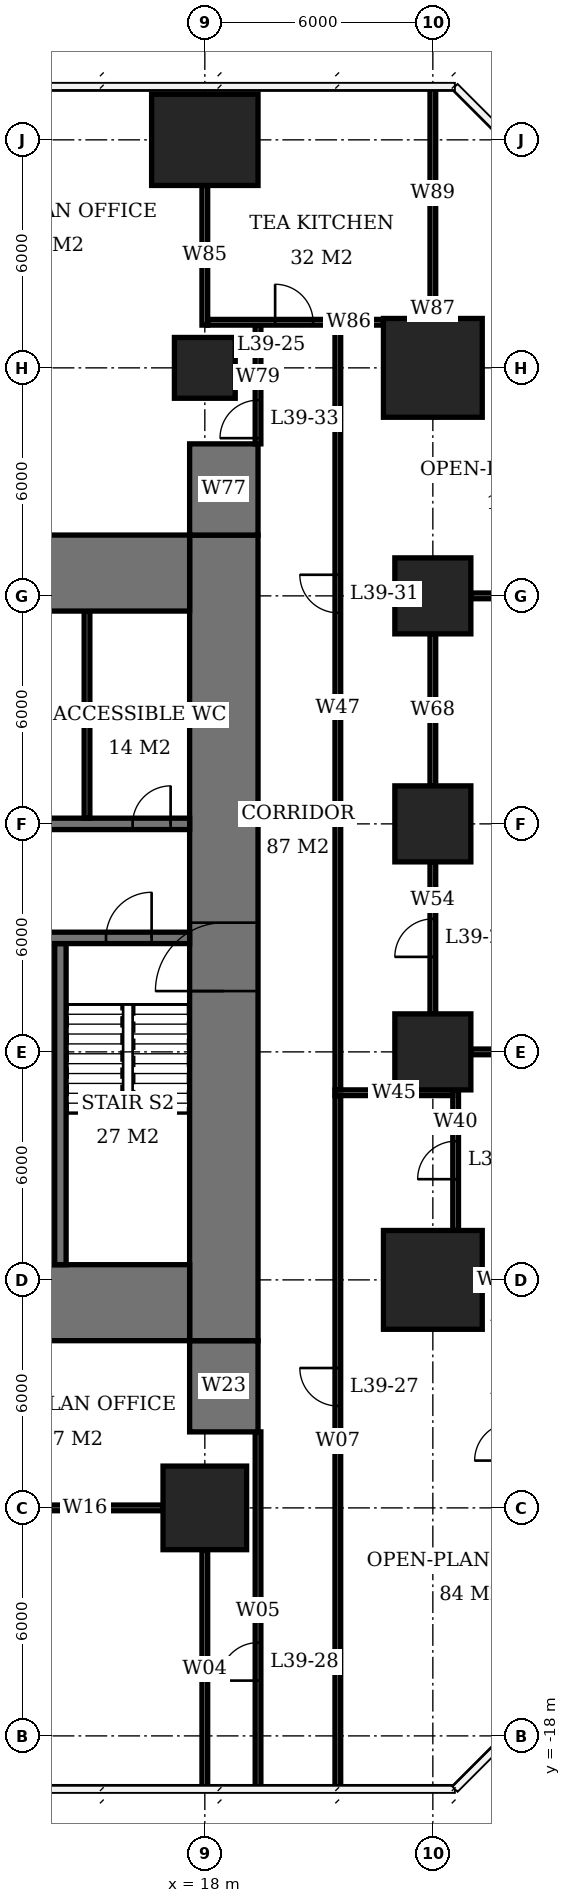
"""IFC4 building model, lengths in metres.
Left out: names, types, materials, properties, quantities, classifications, styles, units other than length and angle.
Written with IfcOpenShell. Run it as: python <this file> out.ifc"""

import sys

from ifc_helpers import new_model, si_unit, direction, frame, frame_2d, origin, origin_2d, place, context, subcontext, project, spatial, rectangle, extrude, element, fill, save


model = new_model("IFC4")
c1 = context("Model", 3, precision=1e-05, world=origin(), true_north=direction((0.0, 1.0)))
c2 = subcontext(c1, "Body", "Model", "MODEL_VIEW")
j1 = project(units=[si_unit("LENGTHUNIT", "METRE"), si_unit("PLANEANGLEUNIT", "RADIAN")], contexts=[c1])
p1 = place(None, origin())
s1 = spatial("IfcSite", under=j1, at=p1, CompositionType="ELEMENT")
p2 = place(p1, origin())
s2 = spatial("IfcBuilding", under=s1, at=p2, CompositionType="ELEMENT")
p3 = place(p2, frame((0.0, 0.0, 160.1)))
s3 = spatial("IfcBuildingStorey", under=s2, at=p3, CompositionType="ELEMENT", Elevation=160.1)
p4 = place(p3, frame((18.0, -12.0, 0.0), z_axis=(0.0, 0.0, 1.0), x_axis=(1.0, 0.0, 0.0)))
e1 = element("IfcColumn", 1, at=p4, inside=s3, PredefinedType="COLUMN", context=c2, shape_type="SweptSolid", body=[
    extrude(rectangle(XDim=2.2, YDim=2.2, at=origin_2d()), origin(), (0.0, 0.0, 1.0), 3.9),
])
p5 = place(p3, frame((18.0, 18.0, 0.0), z_axis=(0.0, 0.0, 1.0), x_axis=(1.0, 0.0, 0.0)))
e2 = element("IfcColumn", 2, at=p5, inside=s3, PredefinedType="COLUMN", context=c2, shape_type="SweptSolid", body=[
    extrude(rectangle(XDim=1.6, YDim=1.6, at=origin_2d()), origin(), (0.0, 0.0, 1.0), 3.9),
])
p6 = place(p3, frame((18.0, 24.0, 0.0), z_axis=(0.0, 0.0, 1.0), x_axis=(1.0, 0.0, 0.0)))
e3 = element("IfcColumn", 3, at=p6, inside=s3, PredefinedType="COLUMN", context=c2, shape_type="SweptSolid", body=[
    extrude(rectangle(XDim=2.8, YDim=2.4, at=origin_2d()), origin(), (0.0, 0.0, 1.0), 3.9),
])
p7 = place(p3, frame((24.0, -6.0, 0.0), z_axis=(0.0, 0.0, 1.0), x_axis=(1.0, 0.0, 0.0)))
e4 = element("IfcColumn", 4, at=p7, inside=s3, PredefinedType="COLUMN", context=c2, shape_type="SweptSolid", body=[
    extrude(rectangle(XDim=2.6, YDim=2.6, at=origin_2d()), origin(), (0.0, 0.0, 1.0), 3.9),
])
for number, where, z_axis, x_axis in (
    (5, (24.0, 0.0, 0.0), (0.0, 0.0, 1.0), (1.0, 0.0, 0.0)),
    (6, (24.0, 6.0, 0.0), (0.0, 0.0, 1.0), (1.0, 0.0, 0.0)),
    (7, (24.0, 12.0, 0.0), (0.0, 0.0, 1.0), (1.0, 0.0, 0.0)),
):
    element("IfcColumn", number, at=place(p3, frame(where, z_axis=z_axis, x_axis=x_axis)), inside=s3, PredefinedType="COLUMN", context=c2, shape_type="SweptSolid", body=[
        extrude(rectangle(XDim=2.0, YDim=2.0, at=origin_2d()), origin(), (0.0, 0.0, 1.0), 3.9),
    ])
p8 = place(p3, frame((24.0, 18.0, 0.0), z_axis=(0.0, 0.0, 1.0), x_axis=(1.0, 0.0, 0.0)))
e8 = element("IfcColumn", 8, at=p8, inside=s3, PredefinedType="COLUMN", context=c2, shape_type="SweptSolid", body=[
    extrude(rectangle(XDim=2.6, YDim=2.6, at=origin_2d()), origin(), (0.0, 0.0, 1.0), 3.9),
])
for number, where, z_axis, x_axis in (
    (9, (-5.6, -6.6, 0.0), (0.0, 0.0, 1.0), (1.0, 0.0, 0.0)),
    (10, (-5.6, 12.6, 0.0), (0.0, 0.0, 1.0), (1.0, 0.0, 0.0)),
):
    element("IfcWall", number, at=place(p3, frame(where, z_axis=z_axis, x_axis=x_axis)), inside=s3, PredefinedType="SHEAR", context=c2, shape_type="SweptSolid", body=[
        extrude(rectangle(XDim=23.2, YDim=2.0, at=frame_2d((11.6, 0.0))), origin(), (0.0, 0.0, 1.0), 3.9),
    ])
p9 = place(p3, frame((18.5, -7.6, 0.0), z_axis=(0.0, 0.0, 1.0), x_axis=(0.0, 1.0, 0.0)))
e11 = element("IfcWall", 11, at=p9, inside=s3, PredefinedType="SHEAR", context=c2, shape_type="SweptSolid", body=[
    extrude(rectangle(XDim=21.2, YDim=1.8, at=frame_2d((10.6, 0.0))), origin(), (0.0, 0.0, 1.0), 3.9),
])
p10 = place(p9, frame((9.2, 0.0, 0.0)))
e12 = element("IfcOpeningElement", 12, at=p10, cuts=e11, PredefinedType="OPENING", context=c2, shape_type="SweptSolid", body=[
    extrude(rectangle(XDim=1.8, YDim=2.4, at=frame_2d((0.9, 1.2))), frame((0.0, 0.91, 0.0), z_axis=(0.0, -1.0, 0.0), x_axis=(1.0, 0.0, 0.0)), (0.0, 0.0, 1.0), 1.82),
])
for number, where, z_axis, x_axis in (
    (13, (18.5, -10.0, 0.0), (0.0, 0.0, 1.0), (0.0, 1.0, 0.0)),
    (14, (18.5, 13.6, 0.0), (0.0, 0.0, 1.0), (0.0, 1.0, 0.0)),
):
    element("IfcWall", number, at=place(p3, frame(where, z_axis=z_axis, x_axis=x_axis)), inside=s3, PredefinedType="SHEAR", context=c2, shape_type="SweptSolid", body=[
        extrude(rectangle(XDim=2.4, YDim=1.8, at=frame_2d((1.2, 0.0))), origin(), (0.0, 0.0, 1.0), 3.9),
    ])
p11 = place(p3, frame((12.15, 3.0, 0.0), z_axis=(0.0, 0.0, 1.0), x_axis=(1.0, 0.0, 0.0)))
e15 = element("IfcWall", 15, at=p11, inside=s3, PredefinedType="SHEAR", context=c2, shape_type="SweptSolid", body=[
    extrude(rectangle(XDim=5.45, YDim=0.3, at=frame_2d((2.725, 0.0))), origin(), (0.0, 0.0, 1.0), 3.9),
])
p12 = place(p11, frame((3.25, 0.0, 0.0)))
e16 = element("IfcOpeningElement", 16, at=p12, cuts=e15, PredefinedType="OPENING", context=c2, shape_type="SweptSolid", body=[
    extrude(rectangle(XDim=1.2, YDim=2.1, at=frame_2d((0.6, 1.05))), frame((0.0, 0.16, 0.0), z_axis=(0.0, -1.0, 0.0), x_axis=(1.0, 0.0, 0.0)), (0.0, 0.0, 1.0), 0.32),
])
p13 = place(p11, frame((0.45, 0.0, 0.0)))
e17 = element("IfcOpeningElement", 17, at=p13, cuts=e15, PredefinedType="OPENING", context=c2, shape_type="SweptSolid", body=[
    extrude(rectangle(XDim=0.9, YDim=2.1, at=frame_2d((0.45, 1.05))), frame((0.0, 0.16, 0.0), z_axis=(0.0, -1.0, 0.0), x_axis=(1.0, 0.0, 0.0)), (0.0, 0.0, 1.0), 0.32),
])
p14 = place(p3, frame((-0.15, 6.0, 0.0), z_axis=(0.0, 0.0, 1.0), x_axis=(1.0, 0.0, 0.0)))
e18 = element("IfcWall", 18, at=p14, inside=s3, PredefinedType="SHEAR", context=c2, shape_type="SweptSolid", body=[
    extrude(rectangle(XDim=17.75, YDim=0.3, at=frame_2d((8.875, 0.0))), origin(), (0.0, 0.0, 1.0), 3.9),
])
p15 = place(p14, frame((13.15, 0.0, 0.0)))
e19 = element("IfcOpeningElement", 19, at=p15, cuts=e18, PredefinedType="OPENING", context=c2, shape_type="SweptSolid", body=[
    extrude(rectangle(XDim=0.9, YDim=2.1, at=frame_2d((0.45, 1.05))), frame((0.0, 0.16, 0.0), z_axis=(0.0, -1.0, 0.0), x_axis=(1.0, 0.0, 0.0)), (0.0, 0.0, 1.0), 0.32),
])
p16 = place(p14, frame((16.25, 0.0, 0.0)))
e20 = element("IfcOpeningElement", 20, at=p16, cuts=e18, PredefinedType="OPENING", context=c2, shape_type="SweptSolid", body=[
    extrude(rectangle(XDim=1.0, YDim=2.1, at=frame_2d((0.5, 1.05))), frame((0.0, 0.16, 0.0), z_axis=(0.0, -1.0, 0.0), x_axis=(1.0, 0.0, 0.0)), (0.0, 0.0, 1.0), 0.32),
])
p17 = place(p14, frame((7.25, 0.0, 0.0)))
e21 = element("IfcOpeningElement", 21, at=p17, cuts=e18, PredefinedType="OPENING", context=c2, shape_type="SweptSolid", body=[
    extrude(rectangle(XDim=1.0, YDim=2.1, at=frame_2d((0.5, 1.05))), frame((0.0, 0.16, 0.0), z_axis=(0.0, -1.0, 0.0), x_axis=(1.0, 0.0, 0.0)), (0.0, 0.0, 1.0), 0.32),
])
p18 = place(p14, frame((1.1, 0.0, 0.0)))
e22 = element("IfcOpeningElement", 22, at=p18, cuts=e18, PredefinedType="OPENING", context=c2, shape_type="SweptSolid", body=[
    extrude(rectangle(XDim=1.1, YDim=2.1, at=frame_2d((0.55, 1.05))), frame((0.0, 0.16, 0.0), z_axis=(0.0, -1.0, 0.0), x_axis=(1.0, 0.0, 0.0)), (0.0, 0.0, 1.0), 0.32),
])
p19 = place(p14, frame((4.1, 0.0, 0.0)))
e23 = element("IfcOpeningElement", 23, at=p19, cuts=e18, PredefinedType="OPENING", context=c2, shape_type="SweptSolid", body=[
    extrude(rectangle(XDim=1.1, YDim=2.1, at=frame_2d((0.55, 1.05))), frame((0.0, 0.16, 0.0), z_axis=(0.0, -1.0, 0.0), x_axis=(1.0, 0.0, 0.0)), (0.0, 0.0, 1.0), 0.32),
])
p20 = place(p3, frame((14.2, -5.6, 0.0), z_axis=(0.0, 0.0, 1.0), x_axis=(0.0, 1.0, 0.0)))
e24 = element("IfcWall", 24, at=p20, inside=s3, PredefinedType="SHEAR", context=c2, shape_type="SweptSolid", body=[
    extrude(rectangle(XDim=8.45, YDim=0.3, at=frame_2d((4.225, 0.0))), origin(), (0.0, 0.0, 1.0), 3.9),
])
p21 = place(p3, frame((14.9, 6.15, 0.0), z_axis=(0.0, 0.0, 1.0), x_axis=(0.0, 1.0, 0.0)))
e25 = element("IfcWall", 25, at=p21, inside=s3, PredefinedType="PLUMBINGWALL", context=c2, shape_type="SweptSolid", body=[
    extrude(rectangle(XDim=5.45, YDim=0.15, at=frame_2d((2.725, 0.0))), origin(), (0.0, 0.0, 1.0), 3.65),
])
p22 = place(p3, frame((12.8, -12.0, 0.0), z_axis=(0.0, 0.0, 1.0), x_axis=(1.0, 0.0, 0.0)))
e26 = element("IfcWall", 26, at=p22, inside=s3, PredefinedType="PARTITIONING", context=c2, shape_type="SweptSolid", body=[
    extrude(rectangle(XDim=4.1, YDim=0.15, at=frame_2d((2.05, 0.0))), origin(), (0.0, 0.0, 1.0), 3.65),
])
p23 = place(p3, frame((25.3, -6.0, 0.0), z_axis=(0.0, 0.0, 1.0), x_axis=(1.0, 0.0, 0.0)))
e27 = element("IfcWall", 27, at=p23, inside=s3, PredefinedType="PARTITIONING", context=c2, shape_type="SweptSolid", body=[
    extrude(rectangle(XDim=0.875, YDim=0.15, at=frame_2d((0.438, 0.0))), origin(), (0.0, 0.0, 1.0), 2.15),
])
for number, where, z_axis, x_axis in (
    (28, (25.0, 0.0, 0.0), (0.0, 0.0, 1.0), (1.0, 0.0, 0.0)),
    (29, (25.0, 12.0, 0.0), (0.0, 0.0, 1.0), (1.0, 0.0, 0.0)),
):
    element("IfcWall", number, at=place(p3, frame(where, z_axis=z_axis, x_axis=x_axis)), inside=s3, PredefinedType="PARTITIONING", context=c2, shape_type="SweptSolid", body=[
        extrude(rectangle(XDim=3.36, YDim=0.15, at=frame_2d((1.68, 0.0))), origin(), (0.0, 0.0, 1.0), 2.15),
    ])
p24 = place(p3, frame((18.075, 19.2, 0.0), z_axis=(0.0, 0.0, 1.0), x_axis=(1.0, 0.0, 0.0)))
e30 = element("IfcWall", 30, at=p24, inside=s3, PredefinedType="PARTITIONING", context=c2, shape_type="SweptSolid", body=[
    extrude(rectangle(XDim=4.625, YDim=0.15, at=frame_2d((2.312, 0.0))), origin(), (0.0, 0.0, 1.0), 3.65),
])
p25 = place(p24, frame((1.775, 0.0, 0.0)))
e31 = element("IfcOpeningElement", 31, at=p25, cuts=e30, PredefinedType="OPENING", context=c2, shape_type="SweptSolid", body=[
    extrude(rectangle(XDim=1.0, YDim=2.1, at=frame_2d((0.5, 1.05))), frame((0.0, 0.085, 0.0), z_axis=(0.0, -1.0, 0.0), x_axis=(1.0, 0.0, 0.0)), (0.0, 0.0, 1.0), 0.17),
])
p26 = place(p3, frame((18.0, -19.4, 0.0), z_axis=(0.0, 0.0, 1.0), x_axis=(0.0, 1.0, 0.0)))
e32 = element("IfcWall", 32, at=p26, inside=s3, PredefinedType="PARTITIONING", context=c2, shape_type="SweptSolid", body=[
    extrude(rectangle(XDim=6.3, YDim=0.15, at=frame_2d((3.15, 0.0))), origin(), (0.0, 0.0, 1.0), 3.65),
])
p27 = place(p3, frame((18.0, 19.125, 0.0), z_axis=(0.0, 0.0, 1.0), x_axis=(0.0, 1.0, 0.0)))
e33 = element("IfcWall", 33, at=p27, inside=s3, PredefinedType="PARTITIONING", context=c2, shape_type="SweptSolid", body=[
    extrude(rectangle(XDim=3.675, YDim=0.15, at=frame_2d((1.837, 0.0))), origin(), (0.0, 0.0, 1.0), 3.65),
])
p28 = place(p3, frame((24.0, 1.0, 0.0), z_axis=(0.0, 0.0, 1.0), x_axis=(0.0, 1.0, 0.0)))
e34 = element("IfcWall", 34, at=p28, inside=s3, PredefinedType="PARTITIONING", context=c2, shape_type="SweptSolid", body=[
    extrude(rectangle(XDim=4.0, YDim=0.15, at=frame_2d((2.0, 0.0))), origin(), (0.0, 0.0, 1.0), 3.65),
])
p29 = place(p28, frame((1.5, 0.0, 0.0)))
e35 = element("IfcOpeningElement", 35, at=p29, cuts=e34, PredefinedType="OPENING", context=c2, shape_type="SweptSolid", body=[
    extrude(rectangle(XDim=1.0, YDim=2.1, at=frame_2d((0.5, 1.05))), frame((0.0, 0.085, 0.0), z_axis=(0.0, -1.0, 0.0), x_axis=(1.0, 0.0, 0.0)), (0.0, 0.0, 1.0), 0.17),
])
p30 = place(p3, frame((24.0, 7.0, 0.0), z_axis=(0.0, 0.0, 1.0), x_axis=(0.0, 1.0, 0.0)))
e36 = element("IfcWall", 36, at=p30, inside=s3, PredefinedType="PARTITIONING", context=c2, shape_type="SweptSolid", body=[
    extrude(rectangle(XDim=4.0, YDim=0.15, at=frame_2d((2.0, 0.0))), origin(), (0.0, 0.0, 1.0), 3.65),
])
p31 = place(p3, frame((24.0, 19.3, 0.0), z_axis=(0.0, 0.0, 1.0), x_axis=(0.0, 1.0, 0.0)))
e37 = element("IfcWall", 37, at=p31, inside=s3, PredefinedType="PARTITIONING", context=c2, shape_type="SweptSolid", body=[
    extrude(rectangle(XDim=0.492, YDim=0.15, at=frame_2d((0.246, 0.0))), origin(), (0.0, 0.0, 1.0), 2.15),
])
p32 = place(p3, frame((24.0, 19.792, 0.0), z_axis=(0.0, 0.0, 1.0), x_axis=(0.0, 1.0, 0.0)))
e38 = element("IfcWall", 38, at=p32, inside=s3, PredefinedType="PARTITIONING", context=c2, shape_type="SweptSolid", body=[
    extrude(rectangle(XDim=5.597, YDim=0.15, at=frame_2d((2.799, 0.0))), origin(), (0.0, 0.0, 1.0), 3.65),
])
p33 = place(p3, frame((24.6, -4.7, 0.0), z_axis=(0.0, 0.0, 1.0), x_axis=(0.0, 1.0, 0.0)))
e39 = element("IfcWall", 39, at=p33, inside=s3, PredefinedType="PARTITIONING", context=c2, shape_type="SweptSolid", body=[
    extrude(rectangle(XDim=3.7, YDim=0.15, at=frame_2d((1.85, 0.0))), origin(), (0.0, 0.0, 1.0), 3.65),
])
p34 = place(p33, frame((1.35, 0.0, 0.0)))
e40 = element("IfcOpeningElement", 40, at=p34, cuts=e39, PredefinedType="OPENING", context=c2, shape_type="SweptSolid", body=[
    extrude(rectangle(XDim=1.0, YDim=2.1, at=frame_2d((0.5, 1.05))), frame((0.0, 0.085, 0.0), z_axis=(0.0, -1.0, 0.0), x_axis=(1.0, 0.0, 0.0)), (0.0, 0.0, 1.0), 0.17),
])
p35 = place(p3, frame((19.4, -19.4, 0.0), z_axis=(0.0, 0.0, 1.0), x_axis=(0.0, 1.0, 0.0)))
e41 = element("IfcWall", 41, at=p35, inside=s3, PredefinedType="PARTITIONING", context=c2, shape_type="SweptSolid", body=[
    extrude(rectangle(XDim=9.4, YDim=0.15, at=frame_2d((4.7, 0.0))), origin(), (0.0, 0.0, 1.0), 3.65),
])
p36 = place(p35, frame((2.855, 0.0, 0.0)))
e42 = element("IfcOpeningElement", 42, at=p36, cuts=e41, PredefinedType="OPENING", context=c2, shape_type="SweptSolid", body=[
    extrude(rectangle(XDim=1.0, YDim=2.1, at=frame_2d((0.5, 1.05))), frame((0.0, 0.085, 0.0), z_axis=(0.0, -1.0, 0.0), x_axis=(1.0, 0.0, 0.0)), (0.0, 0.0, 1.0), 0.17),
])
p37 = place(p3, frame((19.4, 16.0, 0.0), z_axis=(0.0, 0.0, 1.0), x_axis=(0.0, 1.0, 0.0)))
e43 = element("IfcWall", 43, at=p37, inside=s3, PredefinedType="PARTITIONING", context=c2, shape_type="SweptSolid", body=[
    extrude(rectangle(XDim=3.125, YDim=0.15, at=frame_2d((1.562, 0.0))), origin(), (0.0, 0.0, 1.0), 3.65),
])
p38 = place(p37, frame((0.15, 0.0, 0.0)))
e44 = element("IfcOpeningElement", 44, at=p38, cuts=e43, PredefinedType="OPENING", context=c2, shape_type="SweptSolid", body=[
    extrude(rectangle(XDim=1.0, YDim=2.1, at=frame_2d((0.5, 1.05))), frame((0.0, 0.085, 0.0), z_axis=(0.0, -1.0, 0.0), x_axis=(1.0, 0.0, 0.0)), (0.0, 0.0, 1.0), 0.17),
])
p39 = place(p3, frame((21.5, -19.35, 0.0), z_axis=(0.0, 0.0, 1.0), x_axis=(0.0, 1.0, 0.0)))
e45 = element("IfcWall", 45, at=p39, inside=s3, PredefinedType="PARTITIONING", context=c2, shape_type="SweptSolid", body=[
    extrude(rectangle(XDim=18.2, YDim=0.15, at=frame_2d((9.1, 0.0))), origin(), (0.0, 0.0, 1.0), 3.65),
])
p40 = place(p39, frame((10.031, 0.0, 0.0)))
e46 = element("IfcOpeningElement", 46, at=p40, cuts=e45, PredefinedType="OPENING", context=c2, shape_type="SweptSolid", body=[
    extrude(rectangle(XDim=1.0, YDim=2.1, at=frame_2d((0.5, 1.05))), frame((0.0, 0.085, 0.0), z_axis=(0.0, -1.0, 0.0), x_axis=(1.0, 0.0, 0.0)), (0.0, 0.0, 1.0), 0.17),
])
p41 = place(p3, frame((21.5, -1.0, 0.0), z_axis=(0.0, 0.0, 1.0), x_axis=(0.0, 1.0, 0.0)))
e47 = element("IfcWall", 47, at=p41, inside=s3, PredefinedType="PARTITIONING", context=c2, shape_type="SweptSolid", body=[
    extrude(rectangle(XDim=20.125, YDim=0.15, at=frame_2d((10.062, 0.0))), origin(), (0.0, 0.0, 1.0), 3.65),
])
p42 = place(p41, frame((12.555, 0.0, 0.0)))
e48 = element("IfcOpeningElement", 48, at=p42, cuts=e47, PredefinedType="OPENING", context=c2, shape_type="SweptSolid", body=[
    extrude(rectangle(XDim=1.0, YDim=2.1, at=frame_2d((0.5, 1.05))), frame((0.0, 0.085, 0.0), z_axis=(0.0, -1.0, 0.0), x_axis=(1.0, 0.0, 0.0)), (0.0, 0.0, 1.0), 0.17),
])
p43 = place(p3, frame((21.425, -1.075, 0.0), z_axis=(0.0, 0.0, 1.0), x_axis=(1.0, 0.0, 0.0)))
e49 = element("IfcWall", 49, at=p43, inside=s3, PredefinedType="PARTITIONING", context=c2, shape_type="SweptSolid", body=[
    extrude(rectangle(XDim=3.1, YDim=0.15, at=frame_2d((1.55, 0.0))), origin(), (0.0, 0.0, 1.0), 3.65),
])
p44 = place(p10, origin())
e50 = element("IfcDoor", 50, at=p44, inside=s3, OperationType="DOUBLE_DOOR_SINGLE_SWING", PredefinedType="DOOR", context=c2, shape_type="SweptSolid", body=[
    extrude(rectangle(XDim=1.8, YDim=2.4, at=frame_2d((0.9, 1.2))), frame((0.0, 0.025, 0.0), z_axis=(0.0, -1.0, 0.0), x_axis=(1.0, 0.0, 0.0)), (0.0, 0.0, 1.0), 0.05),
])
fill(e12, e50)
p45 = place(p12, origin())
e51 = element("IfcDoor", 51, at=p45, inside=s3, OperationType="SINGLE_SWING_RIGHT", PredefinedType="DOOR", context=c2, shape_type="SweptSolid", body=[
    extrude(rectangle(XDim=1.2, YDim=2.1, at=frame_2d((0.6, 1.05))), frame((0.0, 0.025, 0.0), z_axis=(0.0, -1.0, 0.0), x_axis=(1.0, 0.0, 0.0)), (0.0, 0.0, 1.0), 0.05),
])
fill(e16, e51)
p46 = place(p16, origin())
e52 = element("IfcDoor", 52, at=p46, inside=s3, OperationType="SINGLE_SWING_RIGHT", PredefinedType="DOOR", context=c2, shape_type="SweptSolid", body=[
    extrude(rectangle(XDim=1.0, YDim=2.1, at=frame_2d((0.5, 1.05))), frame((0.0, 0.025, 0.0), z_axis=(0.0, -1.0, 0.0), x_axis=(1.0, 0.0, 0.0)), (0.0, 0.0, 1.0), 0.05),
])
fill(e20, e52)
p47 = place(p34, origin())
e53 = element("IfcDoor", 53, at=p47, inside=s3, OperationType="SINGLE_SWING_LEFT", PredefinedType="DOOR", context=c2, shape_type="SweptSolid", body=[
    extrude(rectangle(XDim=1.0, YDim=2.1, at=frame_2d((0.5, 1.05))), frame((0.0, 0.025, 0.0), z_axis=(0.0, -1.0, 0.0), x_axis=(1.0, 0.0, 0.0)), (0.0, 0.0, 1.0), 0.05),
])
fill(e40, e53)
p48 = place(p29, origin())
e54 = element("IfcDoor", 54, at=p48, inside=s3, OperationType="SINGLE_SWING_LEFT", PredefinedType="DOOR", context=c2, shape_type="SweptSolid", body=[
    extrude(rectangle(XDim=1.0, YDim=2.1, at=frame_2d((0.5, 1.05))), frame((0.0, 0.025, 0.0), z_axis=(0.0, -1.0, 0.0), x_axis=(1.0, 0.0, 0.0)), (0.0, 0.0, 1.0), 0.05),
])
fill(e35, e54)
p49 = place(p25, origin())
e55 = element("IfcDoor", 55, at=p49, inside=s3, OperationType="SINGLE_SWING_LEFT", PredefinedType="DOOR", context=c2, shape_type="SweptSolid", body=[
    extrude(rectangle(XDim=1.0, YDim=2.1, at=frame_2d((0.5, 1.05))), frame((0.0, 0.025, 0.0), z_axis=(0.0, -1.0, 0.0), x_axis=(1.0, 0.0, 0.0)), (0.0, 0.0, 1.0), 0.05),
])
fill(e31, e55)
p50 = place(p40, origin())
e56 = element("IfcDoor", 56, at=p50, inside=s3, OperationType="SINGLE_SWING_RIGHT", PredefinedType="DOOR", context=c2, shape_type="SweptSolid", body=[
    extrude(rectangle(XDim=1.0, YDim=2.1, at=frame_2d((0.5, 1.05))), frame((0.0, 0.025, 0.0), z_axis=(0.0, -1.0, 0.0), x_axis=(1.0, 0.0, 0.0)), (0.0, 0.0, 1.0), 0.05),
])
fill(e46, e56)
p51 = place(p36, origin())
e57 = element("IfcDoor", 57, at=p51, inside=s3, OperationType="SINGLE_SWING_LEFT", PredefinedType="DOOR", context=c2, shape_type="SweptSolid", body=[
    extrude(rectangle(XDim=1.0, YDim=2.1, at=frame_2d((0.5, 1.05))), frame((0.0, 0.025, 0.0), z_axis=(0.0, -1.0, 0.0), x_axis=(1.0, 0.0, 0.0)), (0.0, 0.0, 1.0), 0.05),
])
fill(e42, e57)
p52 = place(p42, origin())
e58 = element("IfcDoor", 58, at=p52, inside=s3, OperationType="SINGLE_SWING_RIGHT", PredefinedType="DOOR", context=c2, shape_type="SweptSolid", body=[
    extrude(rectangle(XDim=1.0, YDim=2.1, at=frame_2d((0.5, 1.05))), frame((0.0, 0.025, 0.0), z_axis=(0.0, -1.0, 0.0), x_axis=(1.0, 0.0, 0.0)), (0.0, 0.0, 1.0), 0.05),
])
fill(e48, e58)
p53 = place(p38, origin())
e59 = element("IfcDoor", 59, at=p53, inside=s3, OperationType="SINGLE_SWING_LEFT", PredefinedType="DOOR", context=c2, shape_type="SweptSolid", body=[
    extrude(rectangle(XDim=1.0, YDim=2.1, at=frame_2d((0.5, 1.05))), frame((0.0, 0.025, 0.0), z_axis=(0.0, -1.0, 0.0), x_axis=(1.0, 0.0, 0.0)), (0.0, 0.0, 1.0), 0.05),
])
fill(e44, e59)
save(model, sys.argv[1])
